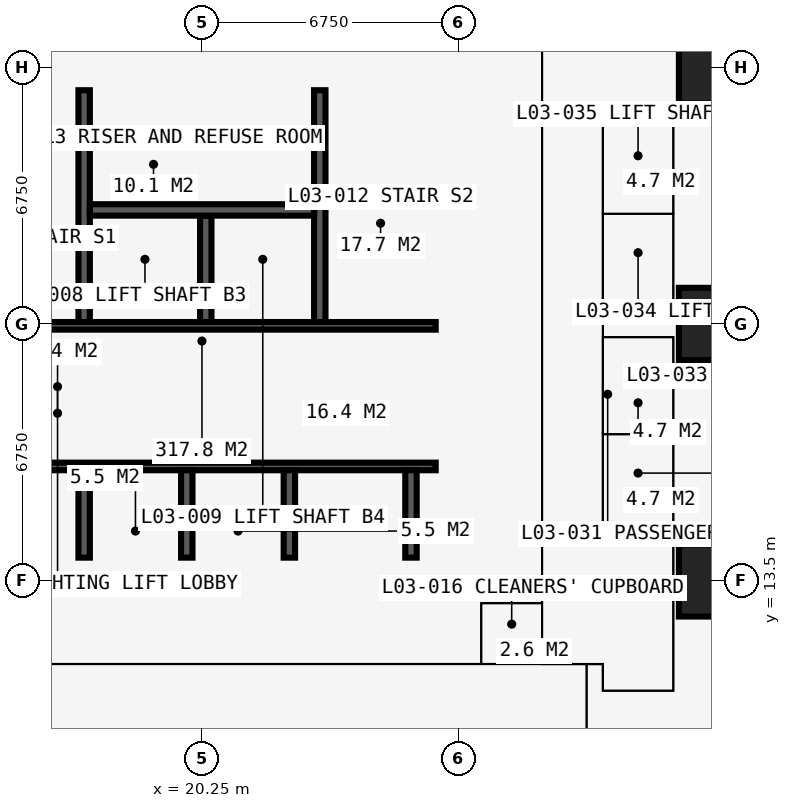
"""IFC4 building model, lengths in metres.
Left out: names, types, materials, properties, quantities, classifications, styles, units other than length and angle.
Written with IfcOpenShell. Run it as: python <this file> out.ifc"""

import sys

from ifc_helpers import new_model, si_unit, direction, frame, frame_2d, origin, origin_2d, place, context, subcontext, project, spatial, rectangle, extrude, element, fill, save


model = new_model("IFC4")
c1 = context("Model", 3, precision=1e-05, world=origin(), true_north=direction((0.0, 1.0)))
c2 = subcontext(c1, "Body", "Model", "MODEL_VIEW")
j1 = project(units=[si_unit("LENGTHUNIT", "METRE"), si_unit("PLANEANGLEUNIT", "RADIAN")], contexts=[c1])
p1 = place(None, origin())
s1 = spatial("IfcSite", under=j1, at=p1, CompositionType="ELEMENT")
p2 = place(p1, origin())
s2 = spatial("IfcBuilding", under=s1, at=p2, CompositionType="ELEMENT")
p3 = place(p2, frame((0.0, 0.0, 13.5)))
s3 = spatial("IfcBuildingStorey", under=s2, at=p3, CompositionType="ELEMENT", Elevation=13.5)
for number, where, z_axis, x_axis in (
    (1, (33.75, 13.5, 0.0), (0.0, 0.0, 1.0), (1.0, 0.0, 0.0)),
    (2, (33.75, 20.25, 0.0), (0.0, 0.0, 1.0), (1.0, 0.0, 0.0)),
    (3, (33.75, 27.0, 0.0), (0.0, 0.0, 1.0), (1.0, 0.0, 0.0)),
):
    element("IfcColumn", number, at=place(p3, frame(where, z_axis=z_axis, x_axis=x_axis)), inside=s3, PredefinedType="COLUMN", context=c2, shape_type="SweptSolid", body=[
        extrude(rectangle(XDim=1.9, YDim=1.9, at=origin_2d()), origin(), (0.0, 0.0, 1.0), 4.5),
    ])
p4 = place(p3, frame((12.9, 13.5, 0.0), z_axis=(0.0, 0.0, 1.0), x_axis=(1.0, 0.0, 0.0)))
e4 = element("IfcWall", 4, at=p4, inside=s3, PredefinedType="SHEAR", context=c2, shape_type="SweptSolid", body=[
    extrude(rectangle(XDim=14.7, YDim=1.2, at=frame_2d((7.35, 0.0))), origin(), (0.0, 0.0, 1.0), 4.5),
])
p5 = place(p3, frame((27.0, 14.1, 0.0), z_axis=(0.0, 0.0, 1.0), x_axis=(0.0, 1.0, 0.0)))
e5 = element("IfcWall", 5, at=p5, inside=s3, PredefinedType="SHEAR", context=c2, shape_type="SweptSolid", body=[
    extrude(rectangle(XDim=12.3, YDim=1.2, at=frame_2d((6.15, 0.0))), origin(), (0.0, 0.0, 1.0), 4.5),
])
p6 = place(p5, frame((3.65, 0.0, 0.0)))
e6 = element("IfcOpeningElement", 6, at=p6, cuts=e5, PredefinedType="OPENING", context=c2, shape_type="SweptSolid", body=[
    extrude(rectangle(XDim=1.2, YDim=2.2, at=frame_2d((0.6, 1.1))), frame((0.0, 0.61, 0.0), z_axis=(0.0, -1.0, 0.0), x_axis=(1.0, 0.0, 0.0)), (0.0, 0.0, 1.0), 1.22),
])
p7 = place(p3, frame((27.6, 27.0, 0.0), z_axis=(0.0, 0.0, 1.0), x_axis=(-1.0, 0.0, 0.0)))
e7 = element("IfcWall", 7, at=p7, inside=s3, PredefinedType="SHEAR", context=c2, shape_type="SweptSolid", body=[
    extrude(rectangle(XDim=14.7, YDim=1.2, at=frame_2d((7.35, 0.0))), origin(), (0.0, 0.0, 1.0), 4.5),
])
p8 = place(p7, frame((4.55, 0.0, 0.0)))
e8 = element("IfcOpeningElement", 8, at=p8, cuts=e7, PredefinedType="OPENING", context=c2, shape_type="SweptSolid", body=[
    extrude(rectangle(XDim=0.9, YDim=2.2, at=frame_2d((0.45, 1.1))), frame((0.0, 0.61, 0.0), z_axis=(0.0, -1.0, 0.0), x_axis=(1.0, 0.0, 0.0)), (0.0, 0.0, 1.0), 1.22),
])
p9 = place(p7, frame((7.525, 0.0, 0.0)))
e9 = element("IfcOpeningElement", 9, at=p9, cuts=e7, PredefinedType="OPENING", context=c2, shape_type="SweptSolid", body=[
    extrude(rectangle(XDim=1.0, YDim=2.2, at=frame_2d((0.5, 1.1))), frame((0.0, 0.61, 0.0), z_axis=(0.0, -1.0, 0.0), x_axis=(1.0, 0.0, 0.0)), (0.0, 0.0, 1.0), 1.22),
])
p10 = place(p3, frame((14.1, 16.5, 0.0), z_axis=(0.0, 0.0, 1.0), x_axis=(1.0, 0.0, 0.0)))
e10 = element("IfcWall", 10, at=p10, inside=s3, PredefinedType="SHEAR", context=c2, shape_type="SweptSolid", body=[
    extrude(rectangle(XDim=12.3, YDim=0.2, at=frame_2d((6.15, 0.0))), origin(), (0.0, 0.0, 1.0), 4.5),
])
p11 = place(p10, frame((0.9, 0.0, 0.0)))
e11 = element("IfcOpeningElement", 11, at=p11, cuts=e10, PredefinedType="OPENING", context=c2, shape_type="SweptSolid", body=[
    extrude(rectangle(XDim=1.1, YDim=2.2, at=frame_2d((0.55, 1.1))), frame((0.0, 0.11, 0.0), z_axis=(0.0, -1.0, 0.0), x_axis=(1.0, 0.0, 0.0)), (0.0, 0.0, 1.0), 0.22),
])
p12 = place(p10, frame((9.5, 0.0, 0.0)))
e12 = element("IfcOpeningElement", 12, at=p12, cuts=e10, PredefinedType="OPENING", context=c2, shape_type="SweptSolid", body=[
    extrude(rectangle(XDim=1.1, YDim=2.2, at=frame_2d((0.55, 1.1))), frame((0.0, 0.11, 0.0), z_axis=(0.0, -1.0, 0.0), x_axis=(1.0, 0.0, 0.0)), (0.0, 0.0, 1.0), 0.22),
])
p13 = place(p3, frame((14.1, 20.2, 0.0), z_axis=(0.0, 0.0, 1.0), x_axis=(1.0, 0.0, 0.0)))
e13 = element("IfcWall", 13, at=p13, inside=s3, PredefinedType="SHEAR", context=c2, shape_type="SweptSolid", body=[
    extrude(rectangle(XDim=12.3, YDim=0.2, at=frame_2d((6.15, 0.0))), origin(), (0.0, 0.0, 1.0), 4.5),
])
p14 = place(p13, frame((0.35, 0.0, 0.0)))
e14 = element("IfcOpeningElement", 14, at=p14, cuts=e13, PredefinedType="OPENING", context=c2, shape_type="SweptSolid", body=[
    extrude(rectangle(XDim=1.1, YDim=2.2, at=frame_2d((0.55, 1.1))), frame((0.0, 0.11, 0.0), z_axis=(0.0, -1.0, 0.0), x_axis=(1.0, 0.0, 0.0)), (0.0, 0.0, 1.0), 0.22),
])
p15 = place(p13, frame((9.75, 0.0, 0.0)))
e15 = element("IfcOpeningElement", 15, at=p15, cuts=e13, PredefinedType="OPENING", context=c2, shape_type="SweptSolid", body=[
    extrude(rectangle(XDim=1.1, YDim=2.2, at=frame_2d((0.55, 1.1))), frame((0.0, 0.11, 0.0), z_axis=(0.0, -1.0, 0.0), x_axis=(1.0, 0.0, 0.0)), (0.0, 0.0, 1.0), 0.22),
])
for number, where, z_axis, x_axis in (
    (16, (17.15, 20.3, 0.0), (0.0, 0.0, 1.0), (0.0, 1.0, 0.0)),
    (17, (23.35, 20.3, 0.0), (0.0, 0.0, 1.0), (0.0, 1.0, 0.0)),
):
    element("IfcWall", number, at=place(p3, frame(where, z_axis=z_axis, x_axis=x_axis)), inside=s3, PredefinedType="SHEAR", context=c2, shape_type="SweptSolid", body=[
        extrude(rectangle(XDim=6.1, YDim=0.3, at=frame_2d((3.05, 0.0))), origin(), (0.0, 0.0, 1.0), 4.5),
    ])
p16 = place(p3, frame((20.35, 20.3, 0.0), z_axis=(0.0, 0.0, 1.0), x_axis=(0.0, 1.0, 0.0)))
e18 = element("IfcWall", 18, at=p16, inside=s3, PredefinedType="SHEAR", context=c2, shape_type="SweptSolid", body=[
    extrude(rectangle(XDim=2.8, YDim=0.3, at=frame_2d((1.4, 0.0))), origin(), (0.0, 0.0, 1.0), 4.5),
])
p17 = place(p3, frame((17.3, 23.25, 0.0), z_axis=(0.0, 0.0, 1.0), x_axis=(1.0, 0.0, 0.0)))
e19 = element("IfcWall", 19, at=p17, inside=s3, PredefinedType="SHEAR", context=c2, shape_type="SweptSolid", body=[
    extrude(rectangle(XDim=5.9, YDim=0.3, at=frame_2d((2.95, 0.0))), origin(), (0.0, 0.0, 1.0), 4.5),
])
for number, where, z_axis, x_axis in (
    (20, (17.15, 14.1, 0.0), (0.0, 0.0, 1.0), (0.0, 1.0, 0.0)),
    (21, (19.85, 14.1, 0.0), (0.0, 0.0, 1.0), (0.0, 1.0, 0.0)),
    (22, (22.55, 14.1, 0.0), (0.0, 0.0, 1.0), (0.0, 1.0, 0.0)),
    (23, (25.75, 14.1, 0.0), (0.0, 0.0, 1.0), (0.0, 1.0, 0.0)),
):
    element("IfcWall", number, at=place(p3, frame(where, z_axis=z_axis, x_axis=x_axis)), inside=s3, PredefinedType="SHEAR", context=c2, shape_type="SweptSolid", body=[
        extrude(rectangle(XDim=2.3, YDim=0.3, at=frame_2d((1.15, 0.0))), origin(), (0.0, 0.0, 1.0), 4.5),
    ])
p18 = place(p3, frame((18.875, 16.6, 0.0), z_axis=(0.0, 0.0, 1.0), x_axis=(0.0, 1.0, 0.0)))
e24 = element("IfcWall", 24, at=p18, inside=s3, PredefinedType="PARTITIONING", context=c2, shape_type="SweptSolid", body=[
    extrude(rectangle(XDim=3.5, YDim=0.15, at=frame_2d((1.75, 0.0))), origin(), (0.0, 0.0, 1.0), 4.275),
])
p19 = place(p18, frame((1.15, 0.0, 0.0)))
e25 = element("IfcOpeningElement", 25, at=p19, cuts=e24, PredefinedType="OPENING", context=c2, shape_type="SweptSolid", body=[
    extrude(rectangle(XDim=1.2, YDim=2.2, at=frame_2d((0.6, 1.1))), frame((0.0, 0.085, 0.0), z_axis=(0.0, -1.0, 0.0), x_axis=(1.0, 0.0, 0.0)), (0.0, 0.0, 1.0), 0.17),
])
p20 = place(p3, frame((21.625, 16.6, 0.0), z_axis=(0.0, 0.0, 1.0), x_axis=(0.0, 1.0, 0.0)))
e26 = element("IfcWall", 26, at=p20, inside=s3, PredefinedType="PARTITIONING", context=c2, shape_type="SweptSolid", body=[
    extrude(rectangle(XDim=3.5, YDim=0.15, at=frame_2d((1.75, 0.0))), origin(), (0.0, 0.0, 1.0), 4.275),
])
p21 = place(p20, frame((1.15, 0.0, 0.0)))
e27 = element("IfcOpeningElement", 27, at=p21, cuts=e26, PredefinedType="OPENING", context=c2, shape_type="SweptSolid", body=[
    extrude(rectangle(XDim=1.2, YDim=2.2, at=frame_2d((0.6, 1.1))), frame((0.0, 0.085, 0.0), z_axis=(0.0, -1.0, 0.0), x_axis=(1.0, 0.0, 0.0)), (0.0, 0.0, 1.0), 0.17),
])
p22 = place(p3, frame((20.725, 23.4, 0.0), z_axis=(0.0, 0.0, 1.0), x_axis=(0.0, 1.0, 0.0)))
e28 = element("IfcWall", 28, at=p22, inside=s3, PredefinedType="PARTITIONING", context=c2, shape_type="SweptSolid", body=[
    extrude(rectangle(XDim=3.0, YDim=0.15, at=frame_2d((1.5, 0.0))), origin(), (0.0, 0.0, 1.0), 4.275),
])
p23 = place(p3, frame((10.125, 11.3, 0.0), z_axis=(0.0, 0.0, 1.0), x_axis=(1.0, 0.0, 0.0)))
e29 = element("IfcWall", 29, at=p23, inside=s3, PredefinedType="PARTITIONING", context=c2, shape_type="SweptSolid", body=[
    extrude(rectangle(XDim=20.675, YDim=0.15, at=frame_2d((10.337, 0.0))), origin(), (0.0, 0.0, 1.0), 4.275),
])
p24 = place(p23, frame((1.725, 0.0, 0.0)))
e30 = element("IfcOpeningElement", 30, at=p24, cuts=e29, PredefinedType="OPENING", context=c2, shape_type="SweptSolid", body=[
    extrude(rectangle(XDim=1.0, YDim=2.2, at=frame_2d((0.5, 1.1))), frame((0.0, 0.085, 0.0), z_axis=(0.0, -1.0, 0.0), x_axis=(1.0, 0.0, 0.0)), (0.0, 0.0, 1.0), 0.17),
])
p25 = place(p23, frame((3.825, 0.0, 0.0)))
e31 = element("IfcOpeningElement", 31, at=p25, cuts=e29, PredefinedType="OPENING", context=c2, shape_type="SweptSolid", body=[
    extrude(rectangle(XDim=1.0, YDim=2.2, at=frame_2d((0.5, 1.1))), frame((0.0, 0.085, 0.0), z_axis=(0.0, -1.0, 0.0), x_axis=(1.0, 0.0, 0.0)), (0.0, 0.0, 1.0), 0.17),
])
p26 = place(p23, frame((10.625, 0.0, 0.0)))
e32 = element("IfcOpeningElement", 32, at=p26, cuts=e29, PredefinedType="OPENING", context=c2, shape_type="SweptSolid", body=[
    extrude(rectangle(XDim=1.6, YDim=2.4, at=frame_2d((0.8, 1.2))), frame((0.0, 0.085, 0.0), z_axis=(0.0, -1.0, 0.0), x_axis=(1.0, 0.0, 0.0)), (0.0, 0.0, 1.0), 0.17),
])
p27 = place(p3, frame((27.6, 11.3, 0.0), z_axis=(0.0, 0.0, 1.0), x_axis=(0.0, 1.0, 0.0)))
e33 = element("IfcWall", 33, at=p27, inside=s3, PredefinedType="PARTITIONING", context=c2, shape_type="SweptSolid", body=[
    extrude(rectangle(XDim=1.6, YDim=0.15, at=frame_2d((0.8, 0.0))), origin(), (0.0, 0.0, 1.0), 4.275),
])
p28 = place(p27, frame((0.3, 0.0, 0.0)))
e34 = element("IfcOpeningElement", 34, at=p28, cuts=e33, PredefinedType="OPENING", context=c2, shape_type="SweptSolid", body=[
    extrude(rectangle(XDim=0.95, YDim=2.2, at=frame_2d((0.475, 1.1))), frame((0.0, 0.085, 0.0), z_axis=(0.0, -1.0, 0.0), x_axis=(1.0, 0.0, 0.0)), (0.0, 0.0, 1.0), 0.17),
])
p29 = place(p3, frame((27.6, 12.9, 0.0), z_axis=(0.0, 0.0, 1.0), x_axis=(1.0, 0.0, 0.0)))
e35 = element("IfcWall", 35, at=p29, inside=s3, PredefinedType="PARTITIONING", context=c2, shape_type="SweptSolid", body=[
    extrude(rectangle(XDim=1.6, YDim=0.15, at=frame_2d((0.8, 0.0))), origin(), (0.0, 0.0, 1.0), 3.777),
])
p30 = place(p3, frame((29.2, 11.3, 0.0), z_axis=(0.0, 0.0, 1.0), x_axis=(0.0, 1.0, 0.0)))
e36 = element("IfcWall", 36, at=p30, inside=s3, PredefinedType="PARTITIONING", context=c2, shape_type="SweptSolid", body=[
    extrude(rectangle(XDim=20.3, YDim=0.15, at=frame_2d((10.15, 0.0))), origin(), (0.0, 0.0, 1.0), 4.275),
])
p31 = place(p30, frame((15.35, 0.0, 0.0)))
e37 = element("IfcOpeningElement", 37, at=p31, cuts=e36, PredefinedType="OPENING", context=c2, shape_type="SweptSolid", body=[
    extrude(rectangle(XDim=1.6, YDim=2.4, at=frame_2d((0.8, 1.2))), frame((0.0, 0.085, 0.0), z_axis=(0.0, -1.0, 0.0), x_axis=(1.0, 0.0, 0.0)), (0.0, 0.0, 1.0), 0.17),
])
p32 = place(p30, frame((8.35, 0.0, 0.0)))
e38 = element("IfcOpeningElement", 38, at=p32, cuts=e36, PredefinedType="OPENING", context=c2, shape_type="SweptSolid", body=[
    extrude(rectangle(XDim=1.2, YDim=2.2, at=frame_2d((0.6, 1.1))), frame((0.0, 0.085, 0.0), z_axis=(0.0, -1.0, 0.0), x_axis=(1.0, 0.0, 0.0)), (0.0, 0.0, 1.0), 0.17),
])
p33 = place(p3, frame((29.2, 25.7, 0.0), z_axis=(0.0, 0.0, 1.0), x_axis=(1.0, 0.0, 0.0)))
e39 = element("IfcWall", 39, at=p33, inside=s3, PredefinedType="SHEAR", context=c2, shape_type="SweptSolid", body=[
    extrude(rectangle(XDim=3.45, YDim=0.1, at=frame_2d((1.725, 0.0))), origin(), (0.0, 0.0, 1.0), 4.275),
])
p34 = place(p3, frame((30.375, -0.734, 0.0), z_axis=(0.0, 0.0, 1.0), x_axis=(0.0, 1.0, 0.0)))
e40 = element("IfcWall", 40, at=p34, inside=s3, PredefinedType="PARTITIONING", context=c2, shape_type="SweptSolid", body=[
    extrude(rectangle(XDim=12.034, YDim=0.15, at=frame_2d((6.017, 0.0))), origin(), (0.0, 0.0, 1.0), 4.275),
])
p35 = place(p3, frame((30.8, 10.6, 0.0), z_axis=(0.0, 0.0, 1.0), x_axis=(0.0, 1.0, 0.0)))
e41 = element("IfcWall", 41, at=p35, inside=s3, PredefinedType="PARTITIONING", context=c2, shape_type="SweptSolid", body=[
    extrude(rectangle(XDim=0.7, YDim=0.15, at=frame_2d((0.35, 0.0))), origin(), (0.0, 0.0, 1.0), 4.275),
])
p36 = place(p3, frame((30.8, 10.6, 0.0), z_axis=(0.0, 0.0, 1.0), x_axis=(1.0, 0.0, 0.0)))
e42 = element("IfcWall", 42, at=p36, inside=s3, PredefinedType="PARTITIONING", context=c2, shape_type="SweptSolid", body=[
    extrude(rectangle(XDim=1.85, YDim=0.15, at=frame_2d((0.925, 0.0))), origin(), (0.0, 0.0, 1.0), 4.275),
])
p37 = place(p3, frame((30.8, 14.8, 0.0), z_axis=(0.0, 0.0, 1.0), x_axis=(0.0, 1.0, 0.0)))
e43 = element("IfcWall", 43, at=p37, inside=s3, PredefinedType="PARTITIONING", context=c2, shape_type="SweptSolid", body=[
    extrude(rectangle(XDim=10.9, YDim=0.15, at=frame_2d((5.45, 0.0))), origin(), (0.0, 0.0, 1.0), 4.275),
])
p38 = place(p37, frame((0.75, 0.0, 0.0)))
e44 = element("IfcOpeningElement", 44, at=p38, cuts=e43, PredefinedType="OPENING", context=c2, shape_type="SweptSolid", body=[
    extrude(rectangle(XDim=1.1, YDim=2.2, at=frame_2d((0.55, 1.1))), frame((0.0, 0.085, 0.0), z_axis=(0.0, -1.0, 0.0), x_axis=(1.0, 0.0, 0.0)), (0.0, 0.0, 1.0), 0.17),
])
p39 = place(p37, frame((3.25, 0.0, 0.0)))
e45 = element("IfcOpeningElement", 45, at=p39, cuts=e43, PredefinedType="OPENING", context=c2, shape_type="SweptSolid", body=[
    extrude(rectangle(XDim=1.1, YDim=2.2, at=frame_2d((0.55, 1.1))), frame((0.0, 0.085, 0.0), z_axis=(0.0, -1.0, 0.0), x_axis=(1.0, 0.0, 0.0)), (0.0, 0.0, 1.0), 0.17),
])
p40 = place(p37, frame((6.5, 0.0, 0.0)))
e46 = element("IfcOpeningElement", 46, at=p40, cuts=e43, PredefinedType="OPENING", context=c2, shape_type="SweptSolid", body=[
    extrude(rectangle(XDim=1.1, YDim=2.2, at=frame_2d((0.55, 1.1))), frame((0.0, 0.085, 0.0), z_axis=(0.0, -1.0, 0.0), x_axis=(1.0, 0.0, 0.0)), (0.0, 0.0, 1.0), 0.17),
])
p41 = place(p37, frame((9.05, 0.0, 0.0)))
e47 = element("IfcOpeningElement", 47, at=p41, cuts=e43, PredefinedType="OPENING", context=c2, shape_type="SweptSolid", body=[
    extrude(rectangle(XDim=1.1, YDim=2.2, at=frame_2d((0.55, 1.1))), frame((0.0, 0.085, 0.0), z_axis=(0.0, -1.0, 0.0), x_axis=(1.0, 0.0, 0.0)), (0.0, 0.0, 1.0), 0.17),
])
for number, where, z_axis, x_axis in (
    (48, (30.8, 14.8, 0.0), (0.0, 0.0, 1.0), (1.0, 0.0, 0.0)),
    (49, (30.8, 17.35, 0.0), (0.0, 0.0, 1.0), (1.0, 0.0, 0.0)),
    (50, (30.8, 19.9, 0.0), (0.0, 0.0, 1.0), (1.0, 0.0, 0.0)),
    (51, (30.8, 20.6, 0.0), (0.0, 0.0, 1.0), (1.0, 0.0, 0.0)),
    (52, (30.8, 23.15, 0.0), (0.0, 0.0, 1.0), (1.0, 0.0, 0.0)),
):
    element("IfcWall", number, at=place(p3, frame(where, z_axis=z_axis, x_axis=x_axis)), inside=s3, PredefinedType="SHEAR", context=c2, shape_type="SweptSolid", body=[
        extrude(rectangle(XDim=1.85, YDim=0.1, at=frame_2d((0.925, 0.0))), origin(), (0.0, 0.0, 1.0), 4.275),
    ])
p42 = place(p3, frame((32.65, 10.6, 0.0), z_axis=(0.0, 0.0, 1.0), x_axis=(0.0, 1.0, 0.0)))
e53 = element("IfcWall", 53, at=p42, inside=s3, PredefinedType="SHEAR", context=c2, shape_type="SweptSolid", body=[
    extrude(rectangle(XDim=9.3, YDim=0.1, at=frame_2d((4.65, 0.0))), origin(), (0.0, 0.0, 1.0), 4.275),
])
p43 = place(p3, frame((32.65, 20.6, 0.0), z_axis=(0.0, 0.0, 1.0), x_axis=(0.0, 1.0, 0.0)))
e54 = element("IfcWall", 54, at=p43, inside=s3, PredefinedType="PARTITIONING", context=c2, shape_type="SweptSolid", body=[
    extrude(rectangle(XDim=5.1, YDim=0.15, at=frame_2d((2.55, 0.0))), origin(), (0.0, 0.0, 1.0), 4.275),
])
p44 = place(p12, origin())
e55 = element("IfcDoor", 55, at=p44, inside=s3, OperationType="DOUBLE_DOOR_SLIDING", PredefinedType="DOOR", context=c2, shape_type="SweptSolid", body=[
    extrude(rectangle(XDim=1.1, YDim=2.2, at=frame_2d((0.55, 1.1))), frame((0.0, 0.025, 0.0), z_axis=(0.0, -1.0, 0.0), x_axis=(1.0, 0.0, 0.0)), (0.0, 0.0, 1.0), 0.05),
])
fill(e12, e55)
p45 = place(p6, origin())
e56 = element("IfcDoor", 56, at=p45, inside=s3, OperationType="DOUBLE_DOOR_SINGLE_SWING", PredefinedType="DOOR", context=c2, shape_type="SweptSolid", body=[
    extrude(rectangle(XDim=1.2, YDim=2.2, at=frame_2d((0.6, 1.1))), frame((0.0, 0.025, 0.0), z_axis=(0.0, -1.0, 0.0), x_axis=(1.0, 0.0, 0.0)), (0.0, 0.0, 1.0), 0.05),
])
fill(e6, e56)
p46 = place(p19, origin())
e57 = element("IfcDoor", 57, at=p46, inside=s3, OperationType="DOUBLE_DOOR_SINGLE_SWING", PredefinedType="DOOR", context=c2, shape_type="SweptSolid", body=[
    extrude(rectangle(XDim=1.2, YDim=2.2, at=frame_2d((0.6, 1.1))), frame((0.0, 0.025, 0.0), z_axis=(0.0, -1.0, 0.0), x_axis=(1.0, 0.0, 0.0)), (0.0, 0.0, 1.0), 0.05),
])
fill(e25, e57)
p47 = place(p21, origin())
e58 = element("IfcDoor", 58, at=p47, inside=s3, OperationType="DOUBLE_DOOR_SINGLE_SWING", PredefinedType="DOOR", context=c2, shape_type="SweptSolid", body=[
    extrude(rectangle(XDim=1.2, YDim=2.2, at=frame_2d((0.6, 1.1))), frame((0.0, 0.025, 0.0), z_axis=(0.0, -1.0, 0.0), x_axis=(1.0, 0.0, 0.0)), (0.0, 0.0, 1.0), 0.05),
])
fill(e27, e58)
p48 = place(p8, origin())
e59 = element("IfcDoor", 59, at=p48, inside=s3, OperationType="SINGLE_SWING_LEFT", PredefinedType="DOOR", context=c2, shape_type="SweptSolid", body=[
    extrude(rectangle(XDim=0.9, YDim=2.2, at=frame_2d((0.45, 1.1))), frame((0.0, 0.4, 0.0), z_axis=(0.0, -1.0, 0.0), x_axis=(1.0, 0.0, 0.0)), (0.0, 0.0, 1.0), 0.8),
])
fill(e8, e59)
p49 = place(p9, origin())
e60 = element("IfcDoor", 60, at=p49, inside=s3, OperationType="SINGLE_SWING_LEFT", PredefinedType="DOOR", context=c2, shape_type="SweptSolid", body=[
    extrude(rectangle(XDim=1.0, YDim=2.2, at=frame_2d((0.5, 1.1))), frame((0.0, 0.025, 0.0), z_axis=(0.0, -1.0, 0.0), x_axis=(1.0, 0.0, 0.0)), (0.0, 0.0, 1.0), 0.05),
])
fill(e9, e60)
p50 = place(p15, origin())
e61 = element("IfcDoor", 61, at=p50, inside=s3, OperationType="SINGLE_SWING_LEFT", PredefinedType="DOOR", context=c2, shape_type="SweptSolid", body=[
    extrude(rectangle(XDim=1.1, YDim=2.2, at=frame_2d((0.55, 1.1))), frame((0.0, 0.025, 0.0), z_axis=(0.0, -1.0, 0.0), x_axis=(1.0, 0.0, 0.0)), (0.0, 0.0, 1.0), 0.05),
])
fill(e15, e61)
p51 = place(p28, origin())
e62 = element("IfcDoor", 62, at=p51, inside=s3, OperationType="SINGLE_SWING_LEFT", PredefinedType="DOOR", context=c2, shape_type="SweptSolid", body=[
    extrude(rectangle(XDim=0.95, YDim=2.2, at=frame_2d((0.475, 1.1))), frame((0.0, 0.025, 0.0), z_axis=(0.0, -1.0, 0.0), x_axis=(1.0, 0.0, 0.0)), (0.0, 0.0, 1.0), 0.05),
])
fill(e34, e62)
p52 = place(p26, origin())
e63 = element("IfcDoor", 63, at=p52, inside=s3, OperationType="DOUBLE_DOOR_SINGLE_SWING", PredefinedType="DOOR", context=c2, shape_type="SweptSolid", body=[
    extrude(rectangle(XDim=1.6, YDim=2.4, at=frame_2d((0.8, 1.2))), frame((0.0, 0.025, 0.0), z_axis=(0.0, -1.0, 0.0), x_axis=(1.0, 0.0, 0.0)), (0.0, 0.0, 1.0), 0.05),
])
fill(e32, e63)
p53 = place(p31, origin())
e64 = element("IfcDoor", 64, at=p53, inside=s3, OperationType="DOUBLE_DOOR_SINGLE_SWING", PredefinedType="DOOR", context=c2, shape_type="SweptSolid", body=[
    extrude(rectangle(XDim=1.6, YDim=2.4, at=frame_2d((0.8, 1.2))), frame((0.0, 0.025, 0.0), z_axis=(0.0, -1.0, 0.0), x_axis=(1.0, 0.0, 0.0)), (0.0, 0.0, 1.0), 0.05),
])
fill(e37, e64)
p54 = place(p38, origin())
e65 = element("IfcDoor", 65, at=p54, inside=s3, OperationType="DOUBLE_DOOR_SLIDING", PredefinedType="DOOR", context=c2, shape_type="SweptSolid", body=[
    extrude(rectangle(XDim=1.1, YDim=2.2, at=frame_2d((0.55, 1.1))), frame((0.0, 0.025, 0.0), z_axis=(0.0, -1.0, 0.0), x_axis=(1.0, 0.0, 0.0)), (0.0, 0.0, 1.0), 0.05),
])
fill(e44, e65)
p55 = place(p39, origin())
e66 = element("IfcDoor", 66, at=p55, inside=s3, OperationType="DOUBLE_DOOR_SLIDING", PredefinedType="DOOR", context=c2, shape_type="SweptSolid", body=[
    extrude(rectangle(XDim=1.1, YDim=2.2, at=frame_2d((0.55, 1.1))), frame((0.0, 0.025, 0.0), z_axis=(0.0, -1.0, 0.0), x_axis=(1.0, 0.0, 0.0)), (0.0, 0.0, 1.0), 0.05),
])
fill(e45, e66)
p56 = place(p40, origin())
e67 = element("IfcDoor", 67, at=p56, inside=s3, OperationType="DOUBLE_DOOR_SLIDING", PredefinedType="DOOR", context=c2, shape_type="SweptSolid", body=[
    extrude(rectangle(XDim=1.1, YDim=2.2, at=frame_2d((0.55, 1.1))), frame((0.0, 0.025, 0.0), z_axis=(0.0, -1.0, 0.0), x_axis=(1.0, 0.0, 0.0)), (0.0, 0.0, 1.0), 0.05),
])
fill(e46, e67)
p57 = place(p41, origin())
e68 = element("IfcDoor", 68, at=p57, inside=s3, OperationType="DOUBLE_DOOR_SLIDING", PredefinedType="DOOR", context=c2, shape_type="SweptSolid", body=[
    extrude(rectangle(XDim=1.1, YDim=2.2, at=frame_2d((0.55, 1.1))), frame((0.0, 0.025, 0.0), z_axis=(0.0, -1.0, 0.0), x_axis=(1.0, 0.0, 0.0)), (0.0, 0.0, 1.0), 0.05),
])
fill(e47, e68)
p58 = place(p32, origin())
e69 = element("IfcDoor", 69, at=p58, inside=s3, OperationType="DOUBLE_DOOR_SINGLE_SWING", PredefinedType="DOOR", context=c2, shape_type="SweptSolid", body=[
    extrude(rectangle(XDim=1.2, YDim=2.2, at=frame_2d((0.6, 1.1))), frame((0.0, 0.025, 0.0), z_axis=(0.0, -1.0, 0.0), x_axis=(1.0, 0.0, 0.0)), (0.0, 0.0, 1.0), 0.05),
])
fill(e38, e69)
save(model, sys.argv[1])
